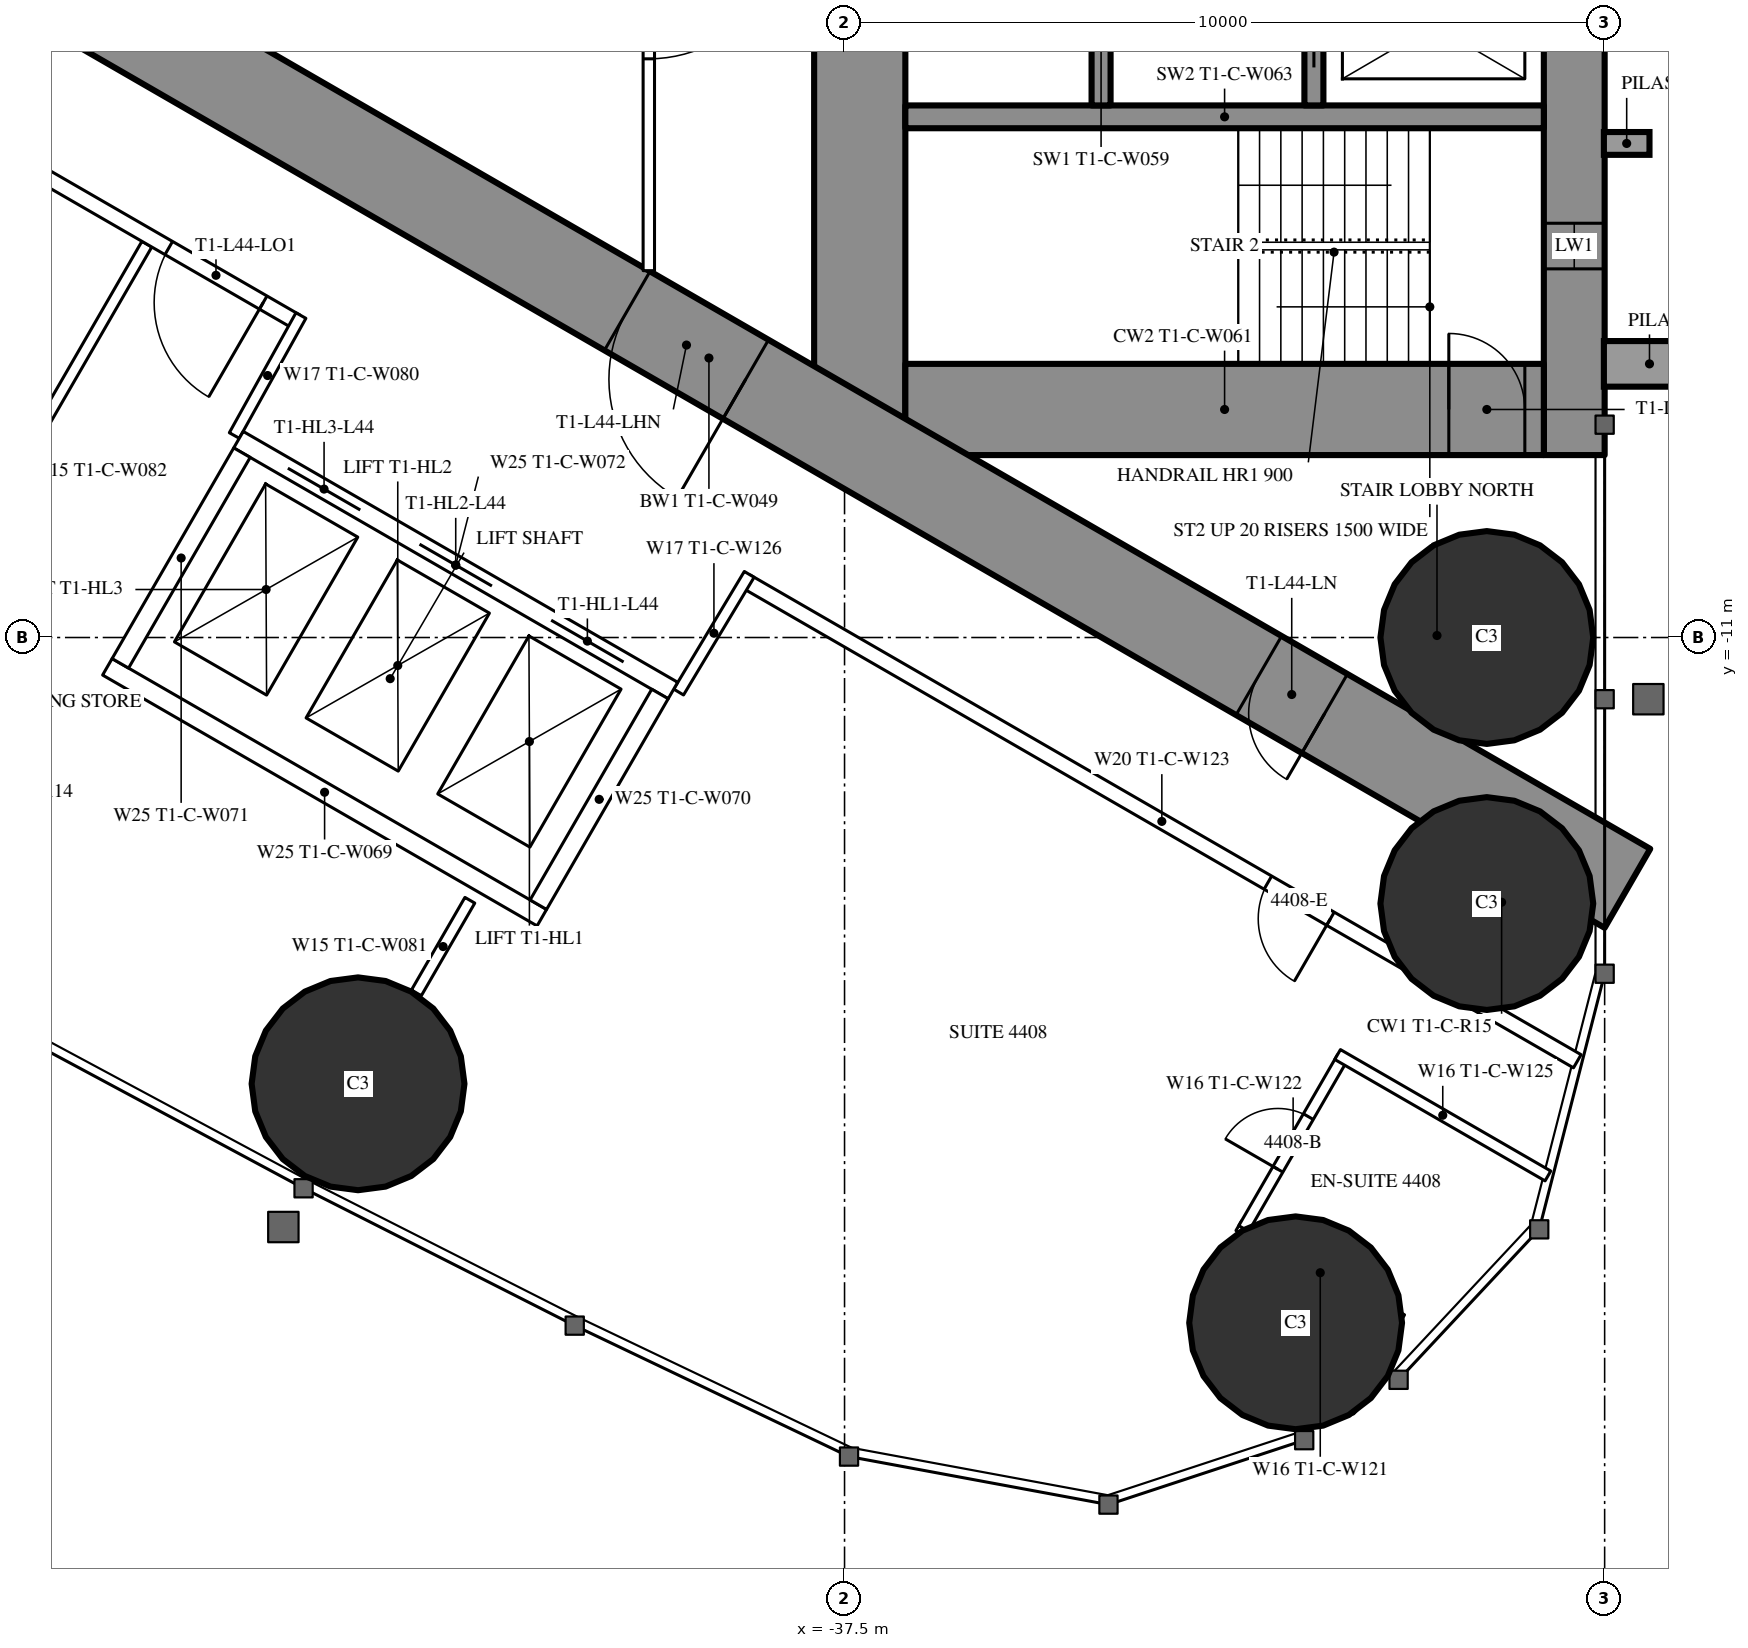
"""IFC4 building model, lengths in metres.
Left out: names, types, materials, properties, quantities, classifications, styles, units other than length and angle.
Written with IfcOpenShell. Run it as: python <this file> out.ifc"""

import sys

from ifc_helpers import new_model, si_unit, direction, frame, frame_2d, origin, origin_2d, place, context, subcontext, project, spatial, rectangle, circle, extrude, element, fill, save


model = new_model("IFC4")
c1 = context("Model", 3, precision=1e-05, world=origin(), true_north=direction((0.0, 1.0)))
c2 = subcontext(c1, "Body", "Model", "MODEL_VIEW")
j1 = project(units=[si_unit("LENGTHUNIT", "METRE"), si_unit("PLANEANGLEUNIT", "RADIAN")], contexts=[c1])
p1 = place(None, origin())
s1 = spatial("IfcSite", under=j1, at=p1, CompositionType="ELEMENT")
p2 = place(p1, origin())
s2 = spatial("IfcBuilding", under=s1, at=p2, CompositionType="ELEMENT")
p3 = place(p2, frame((0.0, 0.0, 166.8)))
s3 = spatial("IfcBuildingStorey", under=s2, at=p3, CompositionType="ELEMENT", Elevation=166.8)
for number, where, z_axis, x_axis in (
    (1, (-31.565, -20.016, 0.0), (0.0, 0.0, 1.0), (1.0, 0.0, 0.0)),
    (2, (-29.05, -11.0, 0.0), (0.0, 0.0, 1.0), (1.0, 0.0, 0.0)),
    (3, (-29.05, -14.5, 0.0), (0.0, 0.0, 1.0), (1.0, 0.0, 0.0)),
    (4, (-43.9, -16.871, 0.0), (0.0, 0.0, 1.0), (1.0, 0.0, 0.0)),
):
    element("IfcColumn", number, at=place(p3, frame(where, z_axis=z_axis, x_axis=x_axis)), inside=s3, PredefinedType="COLUMN", context=c2, shape_type="SweptSolid", body=[
        extrude(circle(Radius=1.4, at=origin_2d()), origin(), (0.0, 0.0, 1.0), 3.5),
    ])
p4 = place(p3, frame((-27.9, 8.6, 0.0), z_axis=(0.0, 0.0, 1.0), x_axis=(0.0, -1.0, 0.0)))
e5 = element("IfcWall", 5, at=p4, inside=s3, PredefinedType="SHEAR", context=c2, shape_type="SweptSolid", body=[
    extrude(rectangle(XDim=17.2, YDim=0.8, at=frame_2d((8.6, 0.0))), origin(), (0.0, 0.0, 1.0), 3.5),
])
p5 = place(p4, frame((2.45, 0.0, 0.6)))
e6 = element("IfcOpeningElement", 6, at=p5, cuts=e5, PredefinedType="OPENING", context=c2, shape_type="SweptSolid", body=[
    extrude(rectangle(XDim=0.6, YDim=2.1, at=frame_2d((0.3, 1.05))), frame((0.0, 0.41, 0.0), z_axis=(0.0, -1.0, 0.0), x_axis=(1.0, 0.0, 0.0)), (0.0, 0.0, 1.0), 0.82),
])
p6 = place(p4, frame((14.15, 0.0, 0.6)))
e7 = element("IfcOpeningElement", 7, at=p6, cuts=e5, PredefinedType="OPENING", context=c2, shape_type="SweptSolid", body=[
    extrude(rectangle(XDim=0.6, YDim=2.1, at=frame_2d((0.3, 1.05))), frame((0.0, 0.41, 0.0), z_axis=(0.0, -1.0, 0.0), x_axis=(1.0, 0.0, 0.0)), (0.0, 0.0, 1.0), 0.82),
])
p7 = place(p3, frame((-37.3, 8.6, 0.0), z_axis=(0.0, 0.0, 1.0), x_axis=(0.0, -1.0, 0.0)))
e8 = element("IfcWall", 8, at=p7, inside=s3, PredefinedType="SHEAR", context=c2, shape_type="SweptSolid", body=[
    extrude(rectangle(XDim=17.2, YDim=1.2, at=frame_2d((8.6, 0.0))), origin(), (0.0, 0.0, 1.0), 3.5),
])
p8 = place(p7, frame((7.7, 0.0, 0.0)))
e9 = element("IfcOpeningElement", 9, at=p8, cuts=e8, PredefinedType="OPENING", context=c2, shape_type="SweptSolid", body=[
    extrude(rectangle(XDim=1.8, YDim=2.2, at=frame_2d((0.9, 1.1))), frame((0.0, 0.61, 0.0), z_axis=(0.0, -1.0, 0.0), x_axis=(1.0, 0.0, 0.0)), (0.0, 0.0, 1.0), 1.22),
])
p9 = place(p3, frame((-28.3, -8.0, 0.0), z_axis=(0.0, 0.0, 1.0), x_axis=(-1.0, 0.0, 0.0)))
e10 = element("IfcWall", 10, at=p9, inside=s3, PredefinedType="SHEAR", context=c2, shape_type="SweptSolid", body=[
    extrude(rectangle(XDim=8.4, YDim=1.2, at=frame_2d((4.2, 0.0))), origin(), (0.0, 0.0, 1.0), 3.5),
])
p10 = place(p9, frame((0.25, 0.0, 0.0)))
e11 = element("IfcOpeningElement", 11, at=p10, cuts=e10, PredefinedType="OPENING", context=c2, shape_type="SweptSolid", body=[
    extrude(rectangle(XDim=1.0, YDim=2.2, at=frame_2d((0.5, 1.1))), frame((0.0, 0.61, 0.0), z_axis=(0.0, -1.0, 0.0), x_axis=(1.0, 0.0, 0.0)), (0.0, 0.0, 1.0), 1.22),
])
p11 = place(p3, frame((-28.3, -4.15, 0.0), z_axis=(0.0, 0.0, 1.0), x_axis=(-1.0, 0.0, 0.0)))
e12 = element("IfcWall", 12, at=p11, inside=s3, PredefinedType="SHEAR", context=c2, shape_type="SweptSolid", body=[
    extrude(rectangle(XDim=8.4, YDim=0.3, at=frame_2d((4.2, 0.0))), origin(), (0.0, 0.0, 1.0), 3.5),
])
p12 = place(p3, frame((-31.325, -1.9, 0.0), z_axis=(0.0, 0.0, 1.0), x_axis=(0.0, -1.0, 0.0)))
e13 = element("IfcWall", 13, at=p12, inside=s3, PredefinedType="SHEAR", context=c2, shape_type="SweptSolid", body=[
    extrude(rectangle(XDim=2.1, YDim=0.25, at=frame_2d((1.05, 0.0))), origin(), (0.0, 0.0, 1.0), 3.5),
])
p13 = place(p12, frame((0.5, 0.0, 0.0)))
e14 = element("IfcOpeningElement", 14, at=p13, cuts=e13, PredefinedType="OPENING", context=c2, shape_type="SweptSolid", body=[
    extrude(rectangle(XDim=1.1, YDim=2.2, at=frame_2d((0.55, 1.1))), frame((0.0, 0.135, 0.0), z_axis=(0.0, -1.0, 0.0), x_axis=(1.0, 0.0, 0.0)), (0.0, 0.0, 1.0), 0.27),
])
p14 = place(p3, frame((-34.125, -1.65, 0.0), z_axis=(0.0, 0.0, 1.0), x_axis=(0.0, -1.0, 0.0)))
e15 = element("IfcWall", 15, at=p14, inside=s3, PredefinedType="SHEAR", context=c2, shape_type="SweptSolid", body=[
    extrude(rectangle(XDim=2.35, YDim=0.25, at=frame_2d((1.175, 0.0))), origin(), (0.0, 0.0, 1.0), 3.5),
])
p15 = place(p3, frame((-27.2, -14.3, 0.0), z_axis=(0.0, 0.0, 1.0), x_axis=(-0.866024021859, 0.500002393557, 0.0)))
e16 = element("IfcWall", 16, at=p15, inside=s3, PredefinedType="SHEAR", context=c2, shape_type="SweptSolid", body=[
    extrude(rectangle(XDim=27.907, YDim=1.2, at=frame_2d((13.954, 0.0))), origin(), (0.0, 0.0, 1.0), 3.5),
])
p16 = place(p15, frame((4.6, 0.0, 0.0)))
e17 = element("IfcOpeningElement", 17, at=p16, cuts=e16, PredefinedType="OPENING", context=c2, shape_type="SweptSolid", body=[
    extrude(rectangle(XDim=1.0, YDim=2.2, at=frame_2d((0.5, 1.1))), frame((0.0, 0.61, 0.0), z_axis=(0.0, -1.0, 0.0), x_axis=(1.0, 0.0, 0.0)), (0.0, 0.0, 1.0), 1.22),
])
p17 = place(p15, frame((13.395, 0.0, 0.0)))
e18 = element("IfcOpeningElement", 18, at=p17, cuts=e16, PredefinedType="OPENING", context=c2, shape_type="SweptSolid", body=[
    extrude(rectangle(XDim=1.8, YDim=2.2, at=frame_2d((0.9, 1.1))), frame((0.0, 0.61, 0.0), z_axis=(0.0, -1.0, 0.0), x_axis=(1.0, 0.0, 0.0)), (0.0, 0.0, 1.0), 1.22),
])
p18 = place(p3, frame((-46.679, -5.825, 0.0), z_axis=(0.0, 0.0, 1.0), x_axis=(-0.500006839597, -0.866021454905, 0.0)))
e19 = element("IfcWall", 19, at=p18, inside=s3, PredefinedType="PARTITIONING", context=c2, shape_type="SweptSolid", body=[
    extrude(rectangle(XDim=6.911, YDim=0.15, at=frame_2d((3.456, 0.0))), origin(), (0.0, 0.0, 1.0), 2.3),
])
p19 = place(p3, frame((-42.429, -14.457, 0.0), z_axis=(0.0, 0.0, 1.0), x_axis=(-0.5000578829, -0.865991982497, 0.0)))
e20 = element("IfcWall", 20, at=p19, inside=s3, PredefinedType="PARTITIONING", context=c2, shape_type="SweptSolid", body=[
    extrude(rectangle(XDim=1.407, YDim=0.15, at=frame_2d((0.704, 0.0))), origin(), (0.0, 0.0, 1.0), 3.25),
])
p20 = place(p3, frame((-27.86, -16.575, 0.0), z_axis=(0.0, 0.0, 1.0), x_axis=(-0.866027756871, 0.499995924312, 0.0)))
e21 = element("IfcWall", 21, at=p20, inside=s3, PredefinedType="PARTITIONING", context=c2, shape_type="SweptSolid", body=[
    extrude(rectangle(XDim=12.622, YDim=0.2, at=frame_2d((6.311, 0.0))), origin(), (0.0, 0.0, 1.0), 3.25),
])
p21 = place(p20, frame((3.75, 0.0, 0.0)))
e22 = element("IfcOpeningElement", 22, at=p21, cuts=e21, PredefinedType="OPENING", context=c2, shape_type="SweptSolid", body=[
    extrude(rectangle(XDim=0.95, YDim=2.2, at=frame_2d((0.475, 1.1))), frame((0.0, 0.11, 0.0), z_axis=(0.0, -1.0, 0.0), x_axis=(1.0, 0.0, 0.0)), (0.0, 0.0, 1.0), 0.22),
])
p22 = place(p3, frame((-44.715, -6.844, 0.0), z_axis=(0.0, 0.0, 1.0), x_axis=(-0.866025261224, 0.500000246922, 0.0)))
e23 = element("IfcWall", 23, at=p22, inside=s3, PredefinedType="PARTITIONING", context=c2, shape_type="SweptSolid", body=[
    extrude(rectangle(XDim=13.567, YDim=0.2, at=frame_2d((6.783, 0.0))), origin(), (0.0, 0.0, 1.0), 3.25),
])
p23 = place(p22, frame((10.579, 0.0, 0.0)))
e24 = element("IfcOpeningElement", 24, at=p23, cuts=e23, PredefinedType="OPENING", context=c2, shape_type="SweptSolid", body=[
    extrude(rectangle(XDim=0.95, YDim=2.2, at=frame_2d((0.475, 1.1))), frame((0.0, 0.11, 0.0), z_axis=(0.0, -1.0, 0.0), x_axis=(1.0, 0.0, 0.0)), (0.0, 0.0, 1.0), 0.22),
])
p24 = place(p22, frame((8.879, 0.0, 0.0)))
e25 = element("IfcOpeningElement", 25, at=p24, cuts=e23, PredefinedType="OPENING", context=c2, shape_type="SweptSolid", body=[
    extrude(rectangle(XDim=0.95, YDim=2.2, at=frame_2d((0.475, 1.1))), frame((0.0, 0.11, 0.0), z_axis=(0.0, -1.0, 0.0), x_axis=(1.0, 0.0, 0.0)), (0.0, 0.0, 1.0), 0.22),
])
p25 = place(p22, frame((0.5, 0.0, 0.0)))
e26 = element("IfcOpeningElement", 26, at=p25, cuts=e23, PredefinedType="OPENING", context=c2, shape_type="SweptSolid", body=[
    extrude(rectangle(XDim=1.435, YDim=2.2, at=frame_2d((0.718, 1.1))), frame((0.0, 0.11, 0.0), z_axis=(0.0, -1.0, 0.0), x_axis=(1.0, 0.0, 0.0)), (0.0, 0.0, 1.0), 0.22),
])
for number, where, z_axis, x_axis in (
    (27, (-39.683, -11.718, 0.0), (0.0, 0.0, 1.0), (0.514, 0.858, 0.0)),
    (28, (-44.652, -6.764, 0.0), (0.0, 0.0, 1.0), (-0.485, -0.874, 0.0)),
):
    element("IfcWall", number, at=place(p3, frame(where, z_axis=z_axis, x_axis=x_axis)), inside=s3, PredefinedType="PARTITIONING", context=c2, shape_type="SweptSolid", body=[
        extrude(rectangle(XDim=1.805, YDim=0.15, at=frame_2d((0.903, 0.0))), origin(), (0.0, 0.0, 1.0), 3.25),
    ])
p26 = place(p3, frame((-30.17, -19.975, 0.0), z_axis=(0.0, 0.0, 1.0), x_axis=(-0.866006523861, 0.500032699561, 0.0)))
e29 = element("IfcWall", 29, at=p26, inside=s3, PredefinedType="PARTITIONING", context=c2, shape_type="SweptSolid", body=[
    extrude(rectangle(XDim=2.475, YDim=0.15, at=frame_2d((1.237, 0.0))), origin(), (0.0, 0.0, 1.0), 3.25),
])
p27 = place(p3, frame((-30.948, -16.524, 0.0), z_axis=(0.0, 0.0, 1.0), x_axis=(-0.500006934395, -0.866021400173, 0.0)))
e30 = element("IfcWall", 30, at=p27, inside=s3, PredefinedType="PARTITIONING", context=c2, shape_type="SweptSolid", body=[
    extrude(rectangle(XDim=2.6, YDim=0.15, at=frame_2d((1.3, 0.0))), origin(), (0.0, 0.0, 1.0), 2.3),
])
p28 = place(p27, frame((0.9, 0.0, 0.0)))
e31 = element("IfcOpeningElement", 31, at=p28, cuts=e30, PredefinedType="OPENING", context=c2, shape_type="SweptSolid", body=[
    extrude(rectangle(XDim=0.8, YDim=2.2, at=frame_2d((0.4, 1.1))), frame((0.0, 0.085, 0.0), z_axis=(0.0, -1.0, 0.0), x_axis=(1.0, 0.0, 0.0)), (0.0, 0.0, 1.0), 0.17),
])
p29 = place(p3, frame((-28.246, -18.084, 0.0), z_axis=(0.0, 0.0, 1.0), x_axis=(-0.866029063467, 0.49999366119, 0.0)))
e32 = element("IfcWall", 32, at=p29, inside=s3, PredefinedType="PARTITIONING", context=c2, shape_type="SweptSolid", body=[
    extrude(rectangle(XDim=3.195, YDim=0.15, at=frame_2d((1.597, 0.0))), origin(), (0.0, 0.0, 1.0), 3.25),
])
p30 = place(p3, frame((-40.075, 1.2, 0.0), z_axis=(0.0, 0.0, 1.0), x_axis=(0.0, -1.0, 0.0)))
e33 = element("IfcWall", 33, at=p30, inside=s3, PredefinedType="PARTITIONING", context=c2, shape_type="SweptSolid", body=[
    extrude(rectangle(XDim=7.374, YDim=0.15, at=frame_2d((3.687, 0.0))), origin(), (0.0, 0.0, 1.0), 3.25),
])
p31 = place(p30, frame((2.787, 0.0, 0.0)))
e34 = element("IfcOpeningElement", 34, at=p31, cuts=e33, PredefinedType="OPENING", context=c2, shape_type="SweptSolid", body=[
    extrude(rectangle(XDim=1.8, YDim=2.2, at=frame_2d((0.9, 1.1))), frame((0.0, 0.085, 0.0), z_axis=(0.0, -1.0, 0.0), x_axis=(1.0, 0.0, 0.0)), (0.0, 0.0, 1.0), 0.17),
])
p32 = place(p3, frame((-39.758, -11.697, 0.0), z_axis=(0.0, 0.0, 1.0), x_axis=(-0.866024194504, 0.500002094529, 0.0)))
e35 = element("IfcWall", 35, at=p32, inside=s3, PredefinedType="PARTITIONING", context=c2, shape_type="SweptSolid", body=[
    extrude(rectangle(XDim=6.6, YDim=0.25, at=frame_2d((3.3, 0.0))), origin(), (0.0, 0.0, 1.0), 3.25),
])
p33 = place(p32, frame((0.75, 0.0, 0.0)))
e36 = element("IfcOpeningElement", 36, at=p33, cuts=e35, PredefinedType="OPENING", context=c2, shape_type="SweptSolid", body=[
    extrude(rectangle(XDim=1.1, YDim=2.2, at=frame_2d((0.55, 1.1))), frame((0.0, 0.135, 0.0), z_axis=(0.0, -1.0, 0.0), x_axis=(1.0, 0.0, 0.0)), (0.0, 0.0, 1.0), 0.27),
])
p34 = place(p32, frame((2.75, 0.0, 0.0)))
e37 = element("IfcOpeningElement", 37, at=p34, cuts=e35, PredefinedType="OPENING", context=c2, shape_type="SweptSolid", body=[
    extrude(rectangle(XDim=1.1, YDim=2.2, at=frame_2d((0.55, 1.1))), frame((0.0, 0.135, 0.0), z_axis=(0.0, -1.0, 0.0), x_axis=(1.0, 0.0, 0.0)), (0.0, 0.0, 1.0), 0.27),
])
p35 = place(p32, frame((4.75, 0.0, 0.0)))
e38 = element("IfcOpeningElement", 38, at=p35, cuts=e35, PredefinedType="OPENING", context=c2, shape_type="SweptSolid", body=[
    extrude(rectangle(XDim=1.1, YDim=2.2, at=frame_2d((0.55, 1.1))), frame((0.0, 0.135, 0.0), z_axis=(0.0, -1.0, 0.0), x_axis=(1.0, 0.0, 0.0)), (0.0, 0.0, 1.0), 0.27),
])
p36 = place(p3, frame((-41.482, -14.686, 0.0), z_axis=(0.0, 0.0, 1.0), x_axis=(-0.86603344179, 0.499986077507, 0.0)))
e39 = element("IfcWall", 39, at=p36, inside=s3, PredefinedType="PARTITIONING", context=c2, shape_type="SweptSolid", body=[
    extrude(rectangle(XDim=6.6, YDim=0.25, at=frame_2d((3.3, 0.0))), origin(), (0.0, 0.0, 1.0), 3.25),
])
for number, where, z_axis, x_axis in (
    (40, (-39.928, -11.743, 0.0), (0.0, 0.0, 1.0), (-0.5, -0.866, 0.0)),
    (41, (-45.428, -8.568, 0.0), (0.0, 0.0, 1.0), (-0.5, -0.866, 0.0)),
):
    element("IfcWall", number, at=place(p3, frame(where, z_axis=z_axis, x_axis=x_axis)), inside=s3, PredefinedType="PARTITIONING", context=c2, shape_type="SweptSolid", body=[
        extrude(rectangle(XDim=3.201, YDim=0.25, at=frame_2d((1.6, 0.0))), origin(), (0.0, 0.0, 1.0), 3.25),
    ])
p37 = place(p28, origin())
e42 = element("IfcDoor", 42, at=p37, inside=s3, OperationType="SINGLE_SWING_RIGHT", PredefinedType="DOOR", context=c2, shape_type="SweptSolid", body=[
    extrude(rectangle(XDim=0.8, YDim=2.2, at=frame_2d((0.4, 1.1))), frame((0.0, 0.025, 0.0), z_axis=(0.0, -1.0, 0.0), x_axis=(1.0, 0.0, 0.0)), (0.0, 0.0, 1.0), 0.05),
])
fill(e31, e42)
p38 = place(p21, origin())
e43 = element("IfcDoor", 43, at=p38, inside=s3, OperationType="SINGLE_SWING_LEFT", PredefinedType="DOOR", context=c2, shape_type="SweptSolid", body=[
    extrude(rectangle(XDim=0.95, YDim=2.2, at=frame_2d((0.475, 1.1))), frame((0.0, 0.025, 0.0), z_axis=(0.0, -1.0, 0.0), x_axis=(1.0, 0.0, 0.0)), (0.0, 0.0, 1.0), 0.05),
])
fill(e22, e43)
p39 = place(p25, origin())
e44 = element("IfcDoor", 44, at=p39, inside=s3, OperationType="SINGLE_SWING_LEFT", PredefinedType="DOOR", context=c2, shape_type="SweptSolid", body=[
    extrude(rectangle(XDim=1.435, YDim=2.2, at=frame_2d((0.718, 1.1))), frame((0.0, 0.025, 0.0), z_axis=(0.0, -1.0, 0.0), x_axis=(1.0, 0.0, 0.0)), (0.0, 0.0, 1.0), 0.05),
])
fill(e26, e44)
p40 = place(p31, origin())
e45 = element("IfcDoor", 45, at=p40, inside=s3, OperationType="DOUBLE_DOOR_SINGLE_SWING", PredefinedType="DOOR", context=c2, shape_type="SweptSolid", body=[
    extrude(rectangle(XDim=1.8, YDim=2.2, at=frame_2d((0.9, 1.1))), frame((0.0, 0.025, 0.0), z_axis=(0.0, -1.0, 0.0), x_axis=(1.0, 0.0, 0.0)), (0.0, 0.0, 1.0), 0.05),
])
fill(e34, e45)
p41 = place(p16, origin())
e46 = element("IfcDoor", 46, at=p41, inside=s3, OperationType="SINGLE_SWING_LEFT", PredefinedType="DOOR", context=c2, shape_type="SweptSolid", body=[
    extrude(rectangle(XDim=1.0, YDim=2.2, at=frame_2d((0.5, 1.1))), frame((0.0, 0.025, 0.0), z_axis=(0.0, -1.0, 0.0), x_axis=(1.0, 0.0, 0.0)), (0.0, 0.0, 1.0), 0.05),
])
fill(e17, e46)
p42 = place(p17, origin())
e47 = element("IfcDoor", 47, at=p42, inside=s3, OperationType="DOUBLE_DOOR_SINGLE_SWING", PredefinedType="DOOR", context=c2, shape_type="SweptSolid", body=[
    extrude(rectangle(XDim=1.8, YDim=2.2, at=frame_2d((0.9, 1.1))), frame((0.0, 0.025, 0.0), z_axis=(0.0, -1.0, 0.0), x_axis=(1.0, 0.0, 0.0)), (0.0, 0.0, 1.0), 0.05),
])
fill(e18, e47)
p43 = place(p10, origin())
e48 = element("IfcDoor", 48, at=p43, inside=s3, OperationType="SINGLE_SWING_RIGHT", PredefinedType="DOOR", context=c2, shape_type="SweptSolid", body=[
    extrude(rectangle(XDim=1.0, YDim=2.2, at=frame_2d((0.5, 1.1))), frame((0.0, 0.025, 0.0), z_axis=(0.0, -1.0, 0.0), x_axis=(1.0, 0.0, 0.0)), (0.0, 0.0, 1.0), 0.05),
])
fill(e11, e48)
p44 = place(p13, origin())
e49 = element("IfcDoor", 49, at=p44, inside=s3, OperationType="SLIDING_TO_LEFT", PredefinedType="USERDEFINED", context=c2, shape_type="SweptSolid", body=[
    extrude(rectangle(XDim=1.1, YDim=2.2, at=frame_2d((0.55, 1.1))), frame((0.0, 0.025, 0.0), z_axis=(0.0, -1.0, 0.0), x_axis=(1.0, 0.0, 0.0)), (0.0, 0.0, 1.0), 0.05),
])
fill(e14, e49)
p45 = place(p33, origin())
e50 = element("IfcDoor", 50, at=p45, inside=s3, OperationType="DOUBLE_DOOR_SLIDING", PredefinedType="USERDEFINED", context=c2, shape_type="SweptSolid", body=[
    extrude(rectangle(XDim=1.1, YDim=2.2, at=frame_2d((0.55, 1.1))), frame((0.0, 0.025, 0.0), z_axis=(0.0, -1.0, 0.0), x_axis=(1.0, 0.0, 0.0)), (0.0, 0.0, 1.0), 0.05),
])
fill(e36, e50)
p46 = place(p34, origin())
e51 = element("IfcDoor", 51, at=p46, inside=s3, OperationType="DOUBLE_DOOR_SLIDING", PredefinedType="USERDEFINED", context=c2, shape_type="SweptSolid", body=[
    extrude(rectangle(XDim=1.1, YDim=2.2, at=frame_2d((0.55, 1.1))), frame((0.0, 0.025, 0.0), z_axis=(0.0, -1.0, 0.0), x_axis=(1.0, 0.0, 0.0)), (0.0, 0.0, 1.0), 0.05),
])
fill(e37, e51)
p47 = place(p35, origin())
e52 = element("IfcDoor", 52, at=p47, inside=s3, OperationType="DOUBLE_DOOR_SLIDING", PredefinedType="USERDEFINED", context=c2, shape_type="SweptSolid", body=[
    extrude(rectangle(XDim=1.1, YDim=2.2, at=frame_2d((0.55, 1.1))), frame((0.0, 0.025, 0.0), z_axis=(0.0, -1.0, 0.0), x_axis=(1.0, 0.0, 0.0)), (0.0, 0.0, 1.0), 0.05),
])
fill(e38, e52)
p48 = place(p6, origin())
e53 = element("IfcWindow", 53, at=p48, inside=s3, PartitioningType="SINGLE_PANEL", PredefinedType="WINDOW", context=c2, shape_type="SweptSolid", body=[
    extrude(rectangle(XDim=0.6, YDim=2.1, at=frame_2d((0.3, 1.05))), frame((0.0, 0.03, 0.0), z_axis=(0.0, -1.0, 0.0), x_axis=(1.0, 0.0, 0.0)), (0.0, 0.0, 1.0), 0.06),
])
fill(e7, e53)
save(model, sys.argv[1])
